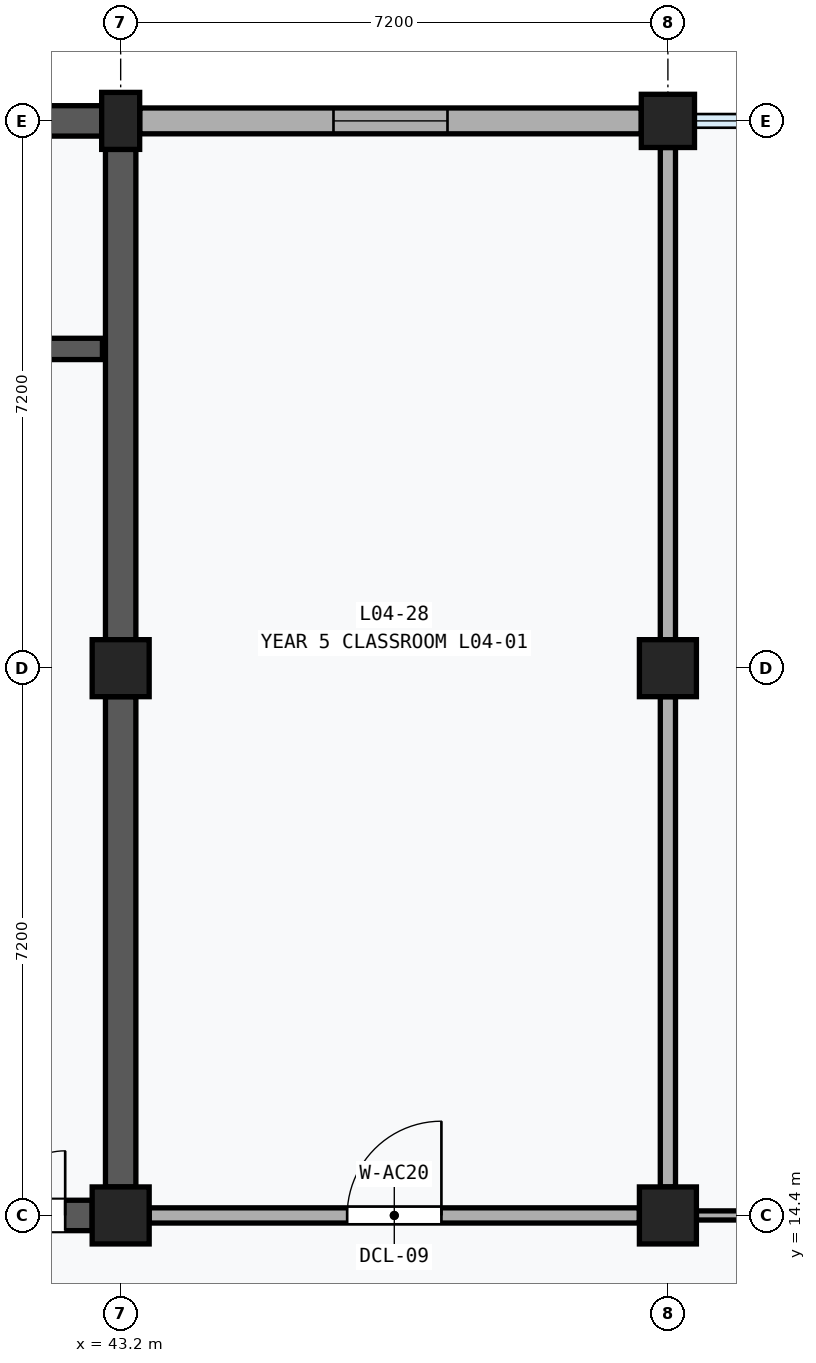
"""IFC4 building model, lengths in metres.
Left out: names, types, materials, properties, quantities, classifications, styles, units other than length and angle.
Written with IfcOpenShell. Run it as: python <this file> out.ifc"""

import sys

from ifc_helpers import new_model, si_unit, direction, frame, frame_2d, origin, origin_2d, place, context, subcontext, project, spatial, rectangle, extrude, element, fill, save


model = new_model("IFC4")
c1 = context("Model", 3, precision=1e-05, world=origin(), true_north=direction((0.0, 1.0)))
c2 = subcontext(c1, "Body", "Model", "MODEL_VIEW")
j1 = project(units=[si_unit("LENGTHUNIT", "METRE"), si_unit("PLANEANGLEUNIT", "RADIAN")], contexts=[c1])
p1 = place(None, origin())
s1 = spatial("IfcSite", under=j1, at=p1, CompositionType="ELEMENT")
p2 = place(p1, origin())
s2 = spatial("IfcBuilding", under=s1, at=p2, CompositionType="ELEMENT")
p3 = place(p2, frame((0.0, 0.0, 18.6)))
s3 = spatial("IfcBuildingStorey", under=s2, at=p3, CompositionType="ELEMENT", Elevation=18.6)
for number, where, z_axis, x_axis in (
    (1, (43.2, 14.4, 0.0), (0.0, 0.0, 1.0), (1.0, 0.0, 0.0)),
    (2, (43.2, 21.6, 0.0), (0.0, 0.0, 1.0), (1.0, 0.0, 0.0)),
):
    element("IfcColumn", number, at=place(p3, frame(where, z_axis=z_axis, x_axis=x_axis)), inside=s3, PredefinedType="COLUMN", context=c2, shape_type="SweptSolid", body=[
        extrude(rectangle(XDim=0.75, YDim=0.75, at=origin_2d()), origin(), (0.0, 0.0, 1.0), 4.0),
    ])
p4 = place(p3, frame((43.2, 28.8, 0.0), z_axis=(0.0, 0.0, 1.0), x_axis=(1.0, 0.0, 0.0)))
e3 = element("IfcColumn", 3, at=p4, inside=s3, PredefinedType="PILASTER", context=c2, shape_type="SweptSolid", body=[
    extrude(rectangle(XDim=0.5, YDim=0.75, at=origin_2d()), origin(), (0.0, 0.0, 1.0), 4.0),
])
for number, where, z_axis, x_axis in (
    (4, (50.4, 14.4, 0.0), (0.0, 0.0, 1.0), (1.0, 0.0, 0.0)),
    (5, (50.4, 21.6, 0.0), (0.0, 0.0, 1.0), (1.0, 0.0, 0.0)),
):
    element("IfcColumn", number, at=place(p3, frame(where, z_axis=z_axis, x_axis=x_axis)), inside=s3, PredefinedType="COLUMN", context=c2, shape_type="SweptSolid", body=[
        extrude(rectangle(XDim=0.75, YDim=0.75, at=origin_2d()), origin(), (0.0, 0.0, 1.0), 4.0),
    ])
p5 = place(p3, frame((50.4, 28.8, 0.0), z_axis=(0.0, 0.0, 1.0), x_axis=(1.0, 0.0, 0.0)))
e6 = element("IfcColumn", 6, at=p5, inside=s3, PredefinedType="COLUMN", context=c2, shape_type="SweptSolid", body=[
    extrude(rectangle(XDim=0.7, YDim=0.7, at=origin_2d()), origin(), (0.0, 0.0, 1.0), 4.0),
])
p6 = place(p3, frame((43.45, 28.8, 0.0), z_axis=(0.0, 0.0, 1.0), x_axis=(1.0, 0.0, 0.0)))
e7 = element("IfcWall", 7, at=p6, inside=s3, PredefinedType="SOLIDWALL", context=c2, shape_type="SweptSolid", body=[
    extrude(rectangle(XDim=6.6, YDim=0.34, at=frame_2d((3.3, 0.0))), origin(), (0.0, 0.0, 1.0), 3.11),
])
p7 = place(p6, frame((2.55, 0.0, 1.1)))
e8 = element("IfcOpeningElement", 8, at=p7, cuts=e7, PredefinedType="OPENING", context=c2, shape_type="SweptSolid", body=[
    extrude(rectangle(XDim=1.5, YDim=1.35, at=frame_2d((0.75, 0.675))), frame((0.0, 0.182, 0.0), z_axis=(0.0, -1.0, 0.0), x_axis=(1.0, 0.0, 0.0)), (0.0, 0.0, 1.0), 0.364),
])
p8 = place(p3, frame((43.2, 14.775, 0.0), z_axis=(0.0, 0.0, 1.0), x_axis=(0.0, 1.0, 0.0)))
e9 = element("IfcWall", 9, at=p8, inside=s3, PredefinedType="SHEAR", context=c2, shape_type="SweptSolid", body=[
    extrude(rectangle(XDim=6.45, YDim=0.4, at=frame_2d((3.225, 0.0))), origin(), (0.0, 0.0, 1.0), 2.97),
])
p9 = place(p3, frame((43.2, 21.975, 0.0), z_axis=(0.0, 0.0, 1.0), x_axis=(0.0, 1.0, 0.0)))
e10 = element("IfcWall", 10, at=p9, inside=s3, PredefinedType="SHEAR", context=c2, shape_type="SweptSolid", body=[
    extrude(rectangle(XDim=6.45, YDim=0.4, at=frame_2d((3.225, 0.0))), origin(), (0.0, 0.0, 1.0), 2.97),
])
p10 = place(p3, frame((36.375, 14.4, 0.0), z_axis=(0.0, 0.0, 1.0), x_axis=(1.0, 0.0, 0.0)))
e11 = element("IfcWall", 11, at=p10, inside=s3, PredefinedType="SHEAR", context=c2, shape_type="SweptSolid", body=[
    extrude(rectangle(XDim=6.45, YDim=0.4, at=frame_2d((3.225, 0.0))), origin(), (0.0, 0.0, 1.0), 2.97),
])
p11 = place(p10, frame((4.395, 0.0, 0.0)))
e12 = element("IfcOpeningElement", 12, at=p11, cuts=e11, PredefinedType="OPENING", context=c2, shape_type="SweptSolid", body=[
    extrude(rectangle(XDim=1.7, YDim=2.25, at=frame_2d((0.85, 1.125))), frame((0.0, 0.212, 0.0), z_axis=(0.0, -1.0, 0.0), x_axis=(1.0, 0.0, 0.0)), (0.0, 0.0, 1.0), 0.424),
])
p12 = place(p3, frame((36.35, 28.8, 0.0), z_axis=(0.0, 0.0, 1.0), x_axis=(1.0, 0.0, 0.0)))
e13 = element("IfcWall", 13, at=p12, inside=s3, PredefinedType="SHEAR", context=c2, shape_type="SweptSolid", body=[
    extrude(rectangle(XDim=6.6, YDim=0.4, at=frame_2d((3.3, 0.0))), origin(), (0.0, 0.0, 1.0), 3.11),
])
p13 = place(p3, frame((40.28, 25.8, 0.0), z_axis=(0.0, 0.0, 1.0), x_axis=(1.0, 0.0, 0.0)))
e14 = element("IfcWall", 14, at=p13, inside=s3, PredefinedType="SHEAR", context=c2, shape_type="SweptSolid", body=[
    extrude(rectangle(XDim=2.68, YDim=0.28, at=frame_2d((1.34, 0.0))), origin(), (0.0, 0.0, 1.0), 3.74),
])
p14 = place(p13, frame((0.65, 0.0, 0.0)))
e15 = element("IfcOpeningElement", 15, at=p14, cuts=e14, PredefinedType="OPENING", context=c2, shape_type="SweptSolid", body=[
    extrude(rectangle(XDim=1.0, YDim=2.15, at=frame_2d((0.5, 1.075))), frame((0.0, 0.152, 0.0), z_axis=(0.0, -1.0, 0.0), x_axis=(1.0, 0.0, 0.0)), (0.0, 0.0, 1.0), 0.304),
])
p15 = place(p3, frame((43.575, 14.4, 0.0), z_axis=(0.0, 0.0, 1.0), x_axis=(1.0, 0.0, 0.0)))
e16 = element("IfcWall", 16, at=p15, inside=s3, PredefinedType="PARTITIONING", context=c2, shape_type="SweptSolid", body=[
    extrude(rectangle(XDim=6.45, YDim=0.2, at=frame_2d((3.225, 0.0))), origin(), (0.0, 0.0, 1.0), 3.04),
])
p16 = place(p15, frame((2.605, 0.0, 0.0)))
e17 = element("IfcOpeningElement", 17, at=p16, cuts=e16, PredefinedType="OPENING", context=c2, shape_type="SweptSolid", body=[
    extrude(rectangle(XDim=1.24, YDim=2.26, at=frame_2d((0.62, 1.13))), frame((0.0, 0.112, 0.0), z_axis=(0.0, -1.0, 0.0), x_axis=(1.0, 0.0, 0.0)), (0.0, 0.0, 1.0), 0.224),
])
p17 = place(p3, frame((50.4, 14.775, 0.0), z_axis=(0.0, 0.0, 1.0), x_axis=(0.0, 1.0, 0.0)))
e18 = element("IfcWall", 18, at=p17, inside=s3, PredefinedType="PARTITIONING", context=c2, shape_type="SweptSolid", body=[
    extrude(rectangle(XDim=6.45, YDim=0.2, at=frame_2d((3.225, 0.0))), origin(), (0.0, 0.0, 1.0), 2.97),
])
p18 = place(p3, frame((50.4, 21.975, 0.0), z_axis=(0.0, 0.0, 1.0), x_axis=(0.0, 1.0, 0.0)))
e19 = element("IfcWall", 19, at=p18, inside=s3, PredefinedType="PARTITIONING", context=c2, shape_type="SweptSolid", body=[
    extrude(rectangle(XDim=6.475, YDim=0.2, at=frame_2d((3.237, 0.0))), origin(), (0.0, 0.0, 1.0), 2.97),
])
p19 = place(p3, frame((50.775, 14.4, 0.0), z_axis=(0.0, 0.0, 1.0), x_axis=(1.0, 0.0, 0.0)))
e20 = element("IfcWall", 20, at=p19, inside=s3, PredefinedType="MOVABLE", context=c2, shape_type="SweptSolid", body=[
    extrude(rectangle(XDim=6.45, YDim=0.12, at=frame_2d((3.225, 0.0))), origin(), (0.0, 0.0, 1.0), 2.97),
])
p20 = place(p19, frame((2.585, 0.0, 0.0)))
e21 = element("IfcOpeningElement", 21, at=p20, cuts=e20, PredefinedType="OPENING", context=c2, shape_type="SweptSolid", body=[
    extrude(rectangle(XDim=1.28, YDim=2.28, at=frame_2d((0.64, 1.14))), frame((0.0, 0.072, 0.0), z_axis=(0.0, -1.0, 0.0), x_axis=(1.0, 0.0, 0.0)), (0.0, 0.0, 1.0), 0.144),
])
p21 = place(p7, origin())
e22 = element("IfcWindow", 22, at=p21, inside=s3, PartitioningType="SINGLE_PANEL", PredefinedType="WINDOW", context=c2, shape_type="SweptSolid", body=[
    extrude(rectangle(XDim=1.5, YDim=1.35, at=frame_2d((0.75, 0.675))), frame((0.0, 0.03, 0.0), z_axis=(0.0, -1.0, 0.0), x_axis=(1.0, 0.0, 0.0)), (0.0, 0.0, 1.0), 0.06),
])
fill(e8, e22)
p22 = place(p11, origin())
e23 = element("IfcDoor", 23, at=p22, inside=s3, OperationType="DOUBLE_DOOR_SINGLE_SWING", PredefinedType="DOOR", context=c2, shape_type="SweptSolid", body=[
    extrude(rectangle(XDim=1.7, YDim=2.25, at=frame_2d((0.85, 1.125))), frame((0.0, 0.025, 0.0), z_axis=(0.0, -1.0, 0.0), x_axis=(1.0, 0.0, 0.0)), (0.0, 0.0, 1.0), 0.05),
])
fill(e12, e23)
p23 = place(p16, origin())
e24 = element("IfcDoor", 24, at=p23, inside=s3, OperationType="SINGLE_SWING_RIGHT", PredefinedType="DOOR", context=c2, shape_type="SweptSolid", body=[
    extrude(rectangle(XDim=1.24, YDim=2.26, at=frame_2d((0.62, 1.13))), frame((0.0, 0.025, 0.0), z_axis=(0.0, -1.0, 0.0), x_axis=(1.0, 0.0, 0.0)), (0.0, 0.0, 1.0), 0.05),
])
fill(e17, e24)
save(model, sys.argv[1])
